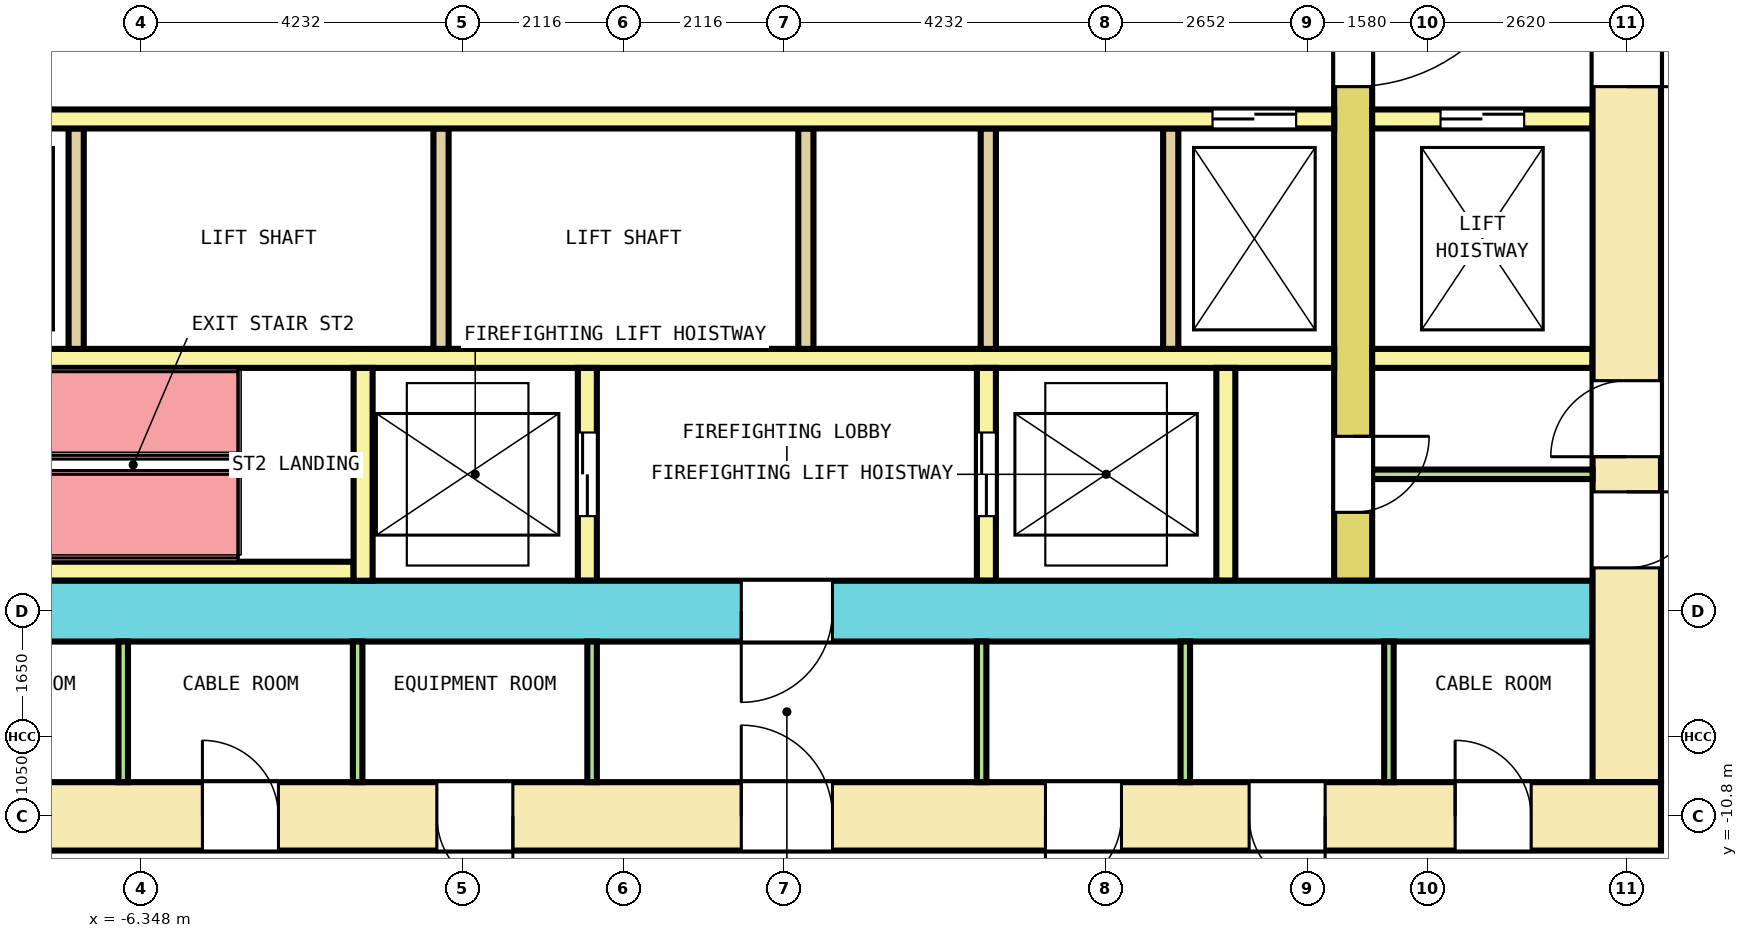
"""IFC4 building model, lengths in metres.
Left out: names, types, materials, properties, quantities, classifications, styles, units other than length and angle.
Written with IfcOpenShell. Run it as: python <this file> out.ifc"""

import sys

from ifc_helpers import new_model, si_unit, direction, frame, frame_2d, origin, place, context, subcontext, project, spatial, rectangle, extrude, element, fill, save


model = new_model("IFC4")
c1 = context("Model", 3, precision=1e-05, world=origin(), true_north=direction((0.0, 1.0)))
c2 = subcontext(c1, "Body", "Model", "MODEL_VIEW")
j1 = project(units=[si_unit("LENGTHUNIT", "METRE"), si_unit("PLANEANGLEUNIT", "RADIAN")], contexts=[c1])
p1 = place(None, origin())
s1 = spatial("IfcSite", under=j1, at=p1, CompositionType="ELEMENT")
p2 = place(p1, origin())
s2 = spatial("IfcBuilding", under=s1, at=p2, CompositionType="ELEMENT")
p3 = place(p2, frame((0.0, 0.0, 58.6)))
s3 = spatial("IfcBuildingStorey", under=s2, at=p3, CompositionType="ELEMENT", Elevation=58.6)
p4 = place(p3, frame((-13.65, -10.8, 0.0), z_axis=(0.0, 0.0, 1.0), x_axis=(1.0, 0.0, 0.0)))
e1 = element("IfcWall", 1, at=p4, inside=s3, PredefinedType="SHEAR", context=c2, shape_type="SweptSolid", body=[
    extrude(rectangle(XDim=27.3, YDim=0.9, at=frame_2d((13.65, 0.0))), origin(), (0.0, 0.0, 1.0), 4.1),
])
p5 = place(p4, frame((1.911, 0.0, 0.0)))
e2 = element("IfcOpeningElement", 2, at=p5, cuts=e1, PredefinedType="OPENING", context=c2, shape_type="SweptSolid", body=[
    extrude(rectangle(XDim=1.0, YDim=2.1, at=frame_2d((0.5, 1.05))), frame((0.0, 0.46, 0.0), z_axis=(0.0, -1.0, 0.0), x_axis=(1.0, 0.0, 0.0)), (0.0, 0.0, 1.0), 0.92),
])
p6 = place(p4, frame((5.027, 0.0, 0.0)))
e3 = element("IfcOpeningElement", 3, at=p6, cuts=e1, PredefinedType="OPENING", context=c2, shape_type="SweptSolid", body=[
    extrude(rectangle(XDim=1.0, YDim=2.1, at=frame_2d((0.5, 1.05))), frame((0.0, 0.46, 0.0), z_axis=(0.0, -1.0, 0.0), x_axis=(1.0, 0.0, 0.0)), (0.0, 0.0, 1.0), 0.92),
])
p7 = place(p4, frame((8.111, 0.0, 0.0)))
e4 = element("IfcOpeningElement", 4, at=p7, cuts=e1, PredefinedType="OPENING", context=c2, shape_type="SweptSolid", body=[
    extrude(rectangle(XDim=1.0, YDim=2.1, at=frame_2d((0.5, 1.05))), frame((0.0, 0.46, 0.0), z_axis=(0.0, -1.0, 0.0), x_axis=(1.0, 0.0, 0.0)), (0.0, 0.0, 1.0), 0.92),
])
p8 = place(p4, frame((11.195, 0.0, 0.0)))
e5 = element("IfcOpeningElement", 5, at=p8, cuts=e1, PredefinedType="OPENING", context=c2, shape_type="SweptSolid", body=[
    extrude(rectangle(XDim=1.0, YDim=2.1, at=frame_2d((0.5, 1.05))), frame((0.0, 0.46, 0.0), z_axis=(0.0, -1.0, 0.0), x_axis=(1.0, 0.0, 0.0)), (0.0, 0.0, 1.0), 0.92),
])
p9 = place(p4, frame((19.202, 0.0, 0.0)))
e6 = element("IfcOpeningElement", 6, at=p9, cuts=e1, PredefinedType="OPENING", context=c2, shape_type="SweptSolid", body=[
    extrude(rectangle(XDim=1.0, YDim=2.1, at=frame_2d((0.5, 1.05))), frame((0.0, 0.46, 0.0), z_axis=(0.0, -1.0, 0.0), x_axis=(1.0, 0.0, 0.0)), (0.0, 0.0, 1.0), 0.92),
])
p10 = place(p4, frame((21.881, 0.0, 0.0)))
e7 = element("IfcOpeningElement", 7, at=p10, cuts=e1, PredefinedType="OPENING", context=c2, shape_type="SweptSolid", body=[
    extrude(rectangle(XDim=1.0, YDim=2.1, at=frame_2d((0.5, 1.05))), frame((0.0, 0.46, 0.0), z_axis=(0.0, -1.0, 0.0), x_axis=(1.0, 0.0, 0.0)), (0.0, 0.0, 1.0), 0.92),
])
p11 = place(p4, frame((24.592, 0.0, 0.0)))
e8 = element("IfcOpeningElement", 8, at=p11, cuts=e1, PredefinedType="OPENING", context=c2, shape_type="SweptSolid", body=[
    extrude(rectangle(XDim=1.0, YDim=2.1, at=frame_2d((0.5, 1.05))), frame((0.0, 0.46, 0.0), z_axis=(0.0, -1.0, 0.0), x_axis=(1.0, 0.0, 0.0)), (0.0, 0.0, 1.0), 0.92),
])
p12 = place(p4, frame((15.2, 0.0, 0.0)))
e9 = element("IfcOpeningElement", 9, at=p12, cuts=e1, PredefinedType="OPENING", context=c2, shape_type="SweptSolid", body=[
    extrude(rectangle(XDim=1.2, YDim=2.1, at=frame_2d((0.6, 1.05))), frame((0.0, 0.46, 0.0), z_axis=(0.0, -1.0, 0.0), x_axis=(1.0, 0.0, 0.0)), (0.0, 0.0, 1.0), 0.92),
])
p13 = place(p3, frame((13.2, -10.35, 0.0), z_axis=(0.0, 0.0, 1.0), x_axis=(0.0, 1.0, 0.0)))
e10 = element("IfcWall", 10, at=p13, inside=s3, PredefinedType="SHEAR", context=c2, shape_type="SweptSolid", body=[
    extrude(rectangle(XDim=20.7, YDim=0.9, at=frame_2d((10.35, 0.0))), origin(), (0.0, 0.0, 1.0), 4.1),
])
p14 = place(p13, frame((9.15, 0.0, 0.0)))
e11 = element("IfcOpeningElement", 11, at=p14, cuts=e10, PredefinedType="OPENING", context=c2, shape_type="SweptSolid", body=[
    extrude(rectangle(XDim=2.4, YDim=2.1, at=frame_2d((1.2, 1.05))), frame((0.0, 0.46, 0.0), z_axis=(0.0, -1.0, 0.0), x_axis=(1.0, 0.0, 0.0)), (0.0, 0.0, 1.0), 0.92),
])
p15 = place(p13, frame((16.05, 0.0, 0.0)))
e12 = element("IfcOpeningElement", 12, at=p15, cuts=e10, PredefinedType="OPENING", context=c2, shape_type="SweptSolid", body=[
    extrude(rectangle(XDim=1.2, YDim=2.1, at=frame_2d((0.6, 1.05))), frame((0.0, 0.46, 0.0), z_axis=(0.0, -1.0, 0.0), x_axis=(1.0, 0.0, 0.0)), (0.0, 0.0, 1.0), 0.92),
])
p16 = place(p13, frame((2.819, 0.0, 0.0)))
e13 = element("IfcOpeningElement", 13, at=p16, cuts=e10, PredefinedType="OPENING", context=c2, shape_type="SweptSolid", body=[
    extrude(rectangle(XDim=1.0, YDim=2.1, at=frame_2d((0.5, 1.05))), frame((0.0, 0.46, 0.0), z_axis=(0.0, -1.0, 0.0), x_axis=(1.0, 0.0, 0.0)), (0.0, 0.0, 1.0), 0.92),
])
p17 = place(p13, frame((4.281, 0.0, 0.0)))
e14 = element("IfcOpeningElement", 14, at=p17, cuts=e10, PredefinedType="OPENING", context=c2, shape_type="SweptSolid", body=[
    extrude(rectangle(XDim=1.0, YDim=2.1, at=frame_2d((0.5, 1.05))), frame((0.0, 0.46, 0.0), z_axis=(0.0, -1.0, 0.0), x_axis=(1.0, 0.0, 0.0)), (0.0, 0.0, 1.0), 0.92),
])
p18 = place(p3, frame((-12.75, -8.1, 0.0), z_axis=(0.0, 0.0, 1.0), x_axis=(1.0, 0.0, 0.0)))
e15 = element("IfcWall", 15, at=p18, inside=s3, PredefinedType="SHEAR", context=c2, shape_type="SweptSolid", body=[
    extrude(rectangle(XDim=25.5, YDim=0.8, at=frame_2d((12.75, 0.0))), origin(), (0.0, 0.0, 1.0), 4.1),
])
p19 = place(p18, frame((14.3, 0.0, 0.0)))
e16 = element("IfcOpeningElement", 16, at=p19, cuts=e15, PredefinedType="OPENING", context=c2, shape_type="SweptSolid", body=[
    extrude(rectangle(XDim=1.2, YDim=2.1, at=frame_2d((0.6, 1.05))), frame((0.0, 0.41, 0.0), z_axis=(0.0, -1.0, 0.0), x_axis=(1.0, 0.0, 0.0)), (0.0, 0.0, 1.0), 0.82),
])
p20 = place(p3, frame((9.6, -7.7, 0.0), z_axis=(0.0, 0.0, 1.0), x_axis=(0.0, 1.0, 0.0)))
e17 = element("IfcWall", 17, at=p20, inside=s3, PredefinedType="SHEAR", context=c2, shape_type="SweptSolid", body=[
    extrude(rectangle(XDim=15.4, YDim=0.5, at=frame_2d((7.7, 0.0))), origin(), (0.0, 0.0, 1.0), 4.1),
])
p21 = place(p20, frame((6.5, 0.0, 0.0)))
e18 = element("IfcOpeningElement", 18, at=p21, cuts=e17, PredefinedType="OPENING", context=c2, shape_type="SweptSolid", body=[
    extrude(rectangle(XDim=2.4, YDim=2.1, at=frame_2d((1.2, 1.05))), frame((0.0, 0.26, 0.0), z_axis=(0.0, -1.0, 0.0), x_axis=(1.0, 0.0, 0.0)), (0.0, 0.0, 1.0), 0.52),
])
p22 = place(p20, frame((13.4, 0.0, 0.0)))
e19 = element("IfcOpeningElement", 19, at=p22, cuts=e17, PredefinedType="OPENING", context=c2, shape_type="SweptSolid", body=[
    extrude(rectangle(XDim=1.2, YDim=2.1, at=frame_2d((0.6, 1.05))), frame((0.0, 0.26, 0.0), z_axis=(0.0, -1.0, 0.0), x_axis=(1.0, 0.0, 0.0)), (0.0, 0.0, 1.0), 0.52),
])
p23 = place(p20, frame((0.9, 0.0, 0.0)))
e20 = element("IfcOpeningElement", 20, at=p23, cuts=e17, PredefinedType="OPENING", context=c2, shape_type="SweptSolid", body=[
    extrude(rectangle(XDim=1.0, YDim=2.1, at=frame_2d((0.5, 1.05))), frame((0.0, 0.26, 0.0), z_axis=(0.0, -1.0, 0.0), x_axis=(1.0, 0.0, 0.0)), (0.0, 0.0, 1.0), 0.52),
])
p24 = place(p3, frame((-9.35, -1.625, 0.0), z_axis=(0.0, 0.0, 1.0), x_axis=(1.0, 0.0, 0.0)))
e21 = element("IfcWall", 21, at=p24, inside=s3, PredefinedType="SOLIDWALL", context=c2, shape_type="SweptSolid", body=[
    extrude(rectangle(XDim=18.7, YDim=0.25, at=frame_2d((9.35, 0.0))), origin(), (0.0, 0.0, 1.0), 4.1),
])
p25 = place(p24, frame((0.5, 0.0, 0.0)))
e22 = element("IfcOpeningElement", 22, at=p25, cuts=e21, PredefinedType="OPENING", context=c2, shape_type="SweptSolid", body=[
    extrude(rectangle(XDim=1.1, YDim=2.1, at=frame_2d((0.55, 1.05))), frame((0.0, 0.135, 0.0), z_axis=(0.0, -1.0, 0.0), x_axis=(1.0, 0.0, 0.0)), (0.0, 0.0, 1.0), 0.27),
])
p26 = place(p24, frame((17.1, 0.0, 0.0)))
e23 = element("IfcOpeningElement", 23, at=p26, cuts=e21, PredefinedType="OPENING", context=c2, shape_type="SweptSolid", body=[
    extrude(rectangle(XDim=1.1, YDim=2.1, at=frame_2d((0.55, 1.05))), frame((0.0, 0.135, 0.0), z_axis=(0.0, -1.0, 0.0), x_axis=(1.0, 0.0, 0.0)), (0.0, 0.0, 1.0), 0.27),
])
p27 = place(p3, frame((9.85, -1.625, 0.0), z_axis=(0.0, 0.0, 1.0), x_axis=(1.0, 0.0, 0.0)))
e24 = element("IfcWall", 24, at=p27, inside=s3, PredefinedType="SOLIDWALL", context=c2, shape_type="SweptSolid", body=[
    extrude(rectangle(XDim=2.9, YDim=0.25, at=frame_2d((1.45, 0.0))), origin(), (0.0, 0.0, 1.0), 4.1),
])
p28 = place(p27, frame((0.9, 0.0, 0.0)))
e25 = element("IfcOpeningElement", 25, at=p28, cuts=e24, PredefinedType="OPENING", context=c2, shape_type="SweptSolid", body=[
    extrude(rectangle(XDim=1.1, YDim=2.1, at=frame_2d((0.55, 1.05))), frame((0.0, 0.135, 0.0), z_axis=(0.0, -1.0, 0.0), x_axis=(1.0, 0.0, 0.0)), (0.0, 0.0, 1.0), 0.27),
])
p29 = place(p3, frame((-9.35, -4.775, 0.0), z_axis=(0.0, 0.0, 1.0), x_axis=(1.0, 0.0, 0.0)))
e26 = element("IfcWall", 26, at=p29, inside=s3, PredefinedType="SOLIDWALL", context=c2, shape_type="SweptSolid", body=[
    extrude(rectangle(XDim=18.7, YDim=0.25, at=frame_2d((9.35, 0.0))), origin(), (0.0, 0.0, 1.0), 4.1),
])
p30 = place(p3, frame((9.85, -4.775, 0.0), z_axis=(0.0, 0.0, 1.0), x_axis=(1.0, 0.0, 0.0)))
e27 = element("IfcWall", 27, at=p30, inside=s3, PredefinedType="SOLIDWALL", context=c2, shape_type="SweptSolid", body=[
    extrude(rectangle(XDim=2.9, YDim=0.25, at=frame_2d((1.45, 0.0))), origin(), (0.0, 0.0, 1.0), 4.1),
])
for number, where, z_axis, x_axis in (
    (28, (-7.2, -4.65, 0.0), (0.0, 0.0, 1.0), (0.0, 1.0, 0.0)),
    (29, (-2.4, -4.65, 0.0), (0.0, 0.0, 1.0), (0.0, 1.0, 0.0)),
    (30, (2.4, -4.65, 0.0), (0.0, 0.0, 1.0), (0.0, 1.0, 0.0)),
    (31, (4.8, -4.65, 0.0), (0.0, 0.0, 1.0), (0.0, 1.0, 0.0)),
    (32, (7.2, -4.65, 0.0), (0.0, 0.0, 1.0), (0.0, 1.0, 0.0)),
):
    element("IfcWall", number, at=place(p3, frame(where, z_axis=z_axis, x_axis=x_axis)), inside=s3, PredefinedType="SOLIDWALL", context=c2, shape_type="SweptSolid", body=[
        extrude(rectangle(XDim=2.9, YDim=0.2, at=frame_2d((1.45, 0.0))), origin(), (0.0, 0.0, 1.0), 4.1),
    ])
p31 = place(p3, frame((-9.35, -7.575, 0.0), z_axis=(0.0, 0.0, 1.0), x_axis=(1.0, 0.0, 0.0)))
e33 = element("IfcWall", 33, at=p31, inside=s3, PredefinedType="SOLIDWALL", context=c2, shape_type="SweptSolid", body=[
    extrude(rectangle(XDim=5.8, YDim=0.25, at=frame_2d((2.9, 0.0))), origin(), (0.0, 0.0, 1.0), 4.1),
])
p32 = place(p3, frame((-3.425, -7.7, 0.0), z_axis=(0.0, 0.0, 1.0), x_axis=(0.0, 1.0, 0.0)))
e34 = element("IfcWall", 34, at=p32, inside=s3, PredefinedType="SOLIDWALL", context=c2, shape_type="SweptSolid", body=[
    extrude(rectangle(XDim=2.8, YDim=0.25, at=frame_2d((1.4, 0.0))), origin(), (0.0, 0.0, 1.0), 4.1),
])
p33 = place(p3, frame((-0.475, -7.7, 0.0), z_axis=(0.0, 0.0, 1.0), x_axis=(0.0, 1.0, 0.0)))
e35 = element("IfcWall", 35, at=p33, inside=s3, PredefinedType="SOLIDWALL", context=c2, shape_type="SweptSolid", body=[
    extrude(rectangle(XDim=2.8, YDim=0.25, at=frame_2d((1.4, 0.0))), origin(), (0.0, 0.0, 1.0), 4.1),
])
p34 = place(p33, frame((0.85, 0.0, 0.0)))
e36 = element("IfcOpeningElement", 36, at=p34, cuts=e35, PredefinedType="OPENING", context=c2, shape_type="SweptSolid", body=[
    extrude(rectangle(XDim=1.1, YDim=2.1, at=frame_2d((0.55, 1.05))), frame((0.0, 0.135, 0.0), z_axis=(0.0, -1.0, 0.0), x_axis=(1.0, 0.0, 0.0)), (0.0, 0.0, 1.0), 0.27),
])
p35 = place(p3, frame((4.775, -7.7, 0.0), z_axis=(0.0, 0.0, 1.0), x_axis=(0.0, 1.0, 0.0)))
e37 = element("IfcWall", 37, at=p35, inside=s3, PredefinedType="SOLIDWALL", context=c2, shape_type="SweptSolid", body=[
    extrude(rectangle(XDim=2.8, YDim=0.25, at=frame_2d((1.4, 0.0))), origin(), (0.0, 0.0, 1.0), 4.1),
])
p36 = place(p35, frame((0.85, 0.0, 0.0)))
e38 = element("IfcOpeningElement", 38, at=p36, cuts=e37, PredefinedType="OPENING", context=c2, shape_type="SweptSolid", body=[
    extrude(rectangle(XDim=1.1, YDim=2.1, at=frame_2d((0.55, 1.05))), frame((0.0, 0.135, 0.0), z_axis=(0.0, -1.0, 0.0), x_axis=(1.0, 0.0, 0.0)), (0.0, 0.0, 1.0), 0.27),
])
p37 = place(p3, frame((7.925, -7.7, 0.0), z_axis=(0.0, 0.0, 1.0), x_axis=(0.0, 1.0, 0.0)))
e39 = element("IfcWall", 39, at=p37, inside=s3, PredefinedType="SOLIDWALL", context=c2, shape_type="SweptSolid", body=[
    extrude(rectangle(XDim=2.8, YDim=0.25, at=frame_2d((1.4, 0.0))), origin(), (0.0, 0.0, 1.0), 4.1),
])
p38 = place(p3, frame((9.85, -6.3, 0.0), z_axis=(0.0, 0.0, 1.0), x_axis=(1.0, 0.0, 0.0)))
e40 = element("IfcWall", 40, at=p38, inside=s3, PredefinedType="PARTITIONING", context=c2, shape_type="SweptSolid", body=[
    extrude(rectangle(XDim=2.9, YDim=0.125, at=frame_2d((1.45, 0.0))), origin(), (0.0, 0.0, 1.0), 4.1),
])
for number, where, z_axis, x_axis in (
    (41, (-6.581, -10.35, 0.0), (0.0, 0.0, 1.0), (0.0, 1.0, 0.0)),
    (42, (-3.497, -10.35, 0.0), (0.0, 0.0, 1.0), (0.0, 1.0, 0.0)),
    (43, (-0.413, -10.35, 0.0), (0.0, 0.0, 1.0), (0.0, 1.0, 0.0)),
    (44, (4.712, -10.35, 0.0), (0.0, 0.0, 1.0), (0.0, 1.0, 0.0)),
    (45, (7.392, -10.35, 0.0), (0.0, 0.0, 1.0), (0.0, 1.0, 0.0)),
    (46, (10.071, -10.35, 0.0), (0.0, 0.0, 1.0), (0.0, 1.0, 0.0)),
):
    element("IfcWall", number, at=place(p3, frame(where, z_axis=z_axis, x_axis=x_axis)), inside=s3, PredefinedType="PARTITIONING", context=c2, shape_type="SweptSolid", body=[
        extrude(rectangle(XDim=1.85, YDim=0.125, at=frame_2d((0.925, 0.0))), origin(), (0.0, 0.0, 1.0), 4.1),
    ])
p39 = place(p26, origin())
e47 = element("IfcDoor", 47, at=p39, inside=s3, OperationType="DOUBLE_DOOR_SLIDING", PredefinedType="DOOR", context=c2, shape_type="SweptSolid", body=[
    extrude(rectangle(XDim=1.1, YDim=2.1, at=frame_2d((0.55, 1.05))), frame((0.0, 0.075, 0.0), z_axis=(0.0, -1.0, 0.0), x_axis=(1.0, 0.0, 0.0)), (0.0, 0.0, 1.0), 0.15),
])
fill(e23, e47)
p40 = place(p28, origin())
e48 = element("IfcDoor", 48, at=p40, inside=s3, OperationType="DOUBLE_DOOR_SLIDING", PredefinedType="DOOR", context=c2, shape_type="SweptSolid", body=[
    extrude(rectangle(XDim=1.1, YDim=2.1, at=frame_2d((0.55, 1.05))), frame((0.0, 0.075, 0.0), z_axis=(0.0, -1.0, 0.0), x_axis=(1.0, 0.0, 0.0)), (0.0, 0.0, 1.0), 0.15),
])
fill(e25, e48)
p41 = place(p34, origin())
e49 = element("IfcDoor", 49, at=p41, inside=s3, OperationType="DOUBLE_DOOR_SLIDING", PredefinedType="DOOR", context=c2, shape_type="SweptSolid", body=[
    extrude(rectangle(XDim=1.1, YDim=2.1, at=frame_2d((0.55, 1.05))), frame((0.0, 0.075, 0.0), z_axis=(0.0, -1.0, 0.0), x_axis=(1.0, 0.0, 0.0)), (0.0, 0.0, 1.0), 0.15),
])
fill(e36, e49)
p42 = place(p36, origin())
e50 = element("IfcDoor", 50, at=p42, inside=s3, OperationType="DOUBLE_DOOR_SLIDING", PredefinedType="DOOR", context=c2, shape_type="SweptSolid", body=[
    extrude(rectangle(XDim=1.1, YDim=2.1, at=frame_2d((0.55, 1.05))), frame((0.0, 0.075, 0.0), z_axis=(0.0, -1.0, 0.0), x_axis=(1.0, 0.0, 0.0)), (0.0, 0.0, 1.0), 0.15),
])
fill(e38, e50)
p43 = place(p21, origin())
e51 = element("IfcDoor", 51, at=p43, inside=s3, OperationType="DOUBLE_DOOR_SINGLE_SWING", PredefinedType="DOOR", context=c2, shape_type="SweptSolid", body=[
    extrude(rectangle(XDim=2.4, YDim=2.1, at=frame_2d((1.2, 1.05))), frame((0.0, 0.2, 0.0), z_axis=(0.0, -1.0, 0.0), x_axis=(1.0, 0.0, 0.0)), (0.0, 0.0, 1.0), 0.4),
])
fill(e18, e51)
p44 = place(p14, origin())
e52 = element("IfcDoor", 52, at=p44, inside=s3, OperationType="DOUBLE_DOOR_SINGLE_SWING", PredefinedType="DOOR", context=c2, shape_type="SweptSolid", body=[
    extrude(rectangle(XDim=2.4, YDim=2.1, at=frame_2d((1.2, 1.05))), frame((0.0, 0.3, 0.0), z_axis=(0.0, -1.0, 0.0), x_axis=(1.0, 0.0, 0.0)), (0.0, 0.0, 1.0), 0.6),
])
fill(e11, e52)
p45 = place(p19, origin())
e53 = element("IfcDoor", 53, at=p45, inside=s3, OperationType="SINGLE_SWING_LEFT", PredefinedType="DOOR", context=c2, shape_type="SweptSolid", body=[
    extrude(rectangle(XDim=1.2, YDim=2.1, at=frame_2d((0.6, 1.05))), frame((0.0, 0.3, 0.0), z_axis=(0.0, -1.0, 0.0), x_axis=(1.0, 0.0, 0.0)), (0.0, 0.0, 1.0), 0.6),
])
fill(e16, e53)
p46 = place(p23, origin())
e54 = element("IfcDoor", 54, at=p46, inside=s3, OperationType="SINGLE_SWING_LEFT", PredefinedType="DOOR", context=c2, shape_type="SweptSolid", body=[
    extrude(rectangle(XDim=1.0, YDim=2.1, at=frame_2d((0.5, 1.05))), frame((0.0, 0.2, 0.0), z_axis=(0.0, -1.0, 0.0), x_axis=(1.0, 0.0, 0.0)), (0.0, 0.0, 1.0), 0.4),
])
fill(e20, e54)
p47 = place(p16, origin())
e55 = element("IfcDoor", 55, at=p47, inside=s3, OperationType="SINGLE_SWING_RIGHT", PredefinedType="DOOR", context=c2, shape_type="SweptSolid", body=[
    extrude(rectangle(XDim=1.0, YDim=2.1, at=frame_2d((0.5, 1.05))), frame((0.0, 0.3, 0.0), z_axis=(0.0, -1.0, 0.0), x_axis=(1.0, 0.0, 0.0)), (0.0, 0.0, 1.0), 0.6),
])
fill(e13, e55)
p48 = place(p17, origin())
e56 = element("IfcDoor", 56, at=p48, inside=s3, OperationType="SINGLE_SWING_LEFT", PredefinedType="DOOR", context=c2, shape_type="SweptSolid", body=[
    extrude(rectangle(XDim=1.0, YDim=2.1, at=frame_2d((0.5, 1.05))), frame((0.0, 0.3, 0.0), z_axis=(0.0, -1.0, 0.0), x_axis=(1.0, 0.0, 0.0)), (0.0, 0.0, 1.0), 0.6),
])
fill(e14, e56)
p49 = place(p7, origin())
e57 = element("IfcDoor", 57, at=p49, inside=s3, OperationType="SINGLE_SWING_LEFT", PredefinedType="DOOR", context=c2, shape_type="SweptSolid", body=[
    extrude(rectangle(XDim=1.0, YDim=2.1, at=frame_2d((0.5, 1.05))), frame((0.0, 0.3, 0.0), z_axis=(0.0, -1.0, 0.0), x_axis=(1.0, 0.0, 0.0)), (0.0, 0.0, 1.0), 0.6),
])
fill(e4, e57)
p50 = place(p8, origin())
e58 = element("IfcDoor", 58, at=p50, inside=s3, OperationType="SINGLE_SWING_RIGHT", PredefinedType="DOOR", context=c2, shape_type="SweptSolid", body=[
    extrude(rectangle(XDim=1.0, YDim=2.1, at=frame_2d((0.5, 1.05))), frame((0.0, 0.3, 0.0), z_axis=(0.0, -1.0, 0.0), x_axis=(1.0, 0.0, 0.0)), (0.0, 0.0, 1.0), 0.6),
])
fill(e5, e58)
p51 = place(p9, origin())
e59 = element("IfcDoor", 59, at=p51, inside=s3, OperationType="SINGLE_SWING_LEFT", PredefinedType="DOOR", context=c2, shape_type="SweptSolid", body=[
    extrude(rectangle(XDim=1.0, YDim=2.1, at=frame_2d((0.5, 1.05))), frame((0.0, 0.3, 0.0), z_axis=(0.0, -1.0, 0.0), x_axis=(1.0, 0.0, 0.0)), (0.0, 0.0, 1.0), 0.6),
])
fill(e6, e59)
p52 = place(p10, origin())
e60 = element("IfcDoor", 60, at=p52, inside=s3, OperationType="SINGLE_SWING_RIGHT", PredefinedType="DOOR", context=c2, shape_type="SweptSolid", body=[
    extrude(rectangle(XDim=1.0, YDim=2.1, at=frame_2d((0.5, 1.05))), frame((0.0, 0.3, 0.0), z_axis=(0.0, -1.0, 0.0), x_axis=(1.0, 0.0, 0.0)), (0.0, 0.0, 1.0), 0.6),
])
fill(e7, e60)
p53 = place(p11, origin())
e61 = element("IfcDoor", 61, at=p53, inside=s3, OperationType="SINGLE_SWING_LEFT", PredefinedType="DOOR", context=c2, shape_type="SweptSolid", body=[
    extrude(rectangle(XDim=1.0, YDim=2.1, at=frame_2d((0.5, 1.05))), frame((0.0, 0.3, 0.0), z_axis=(0.0, -1.0, 0.0), x_axis=(1.0, 0.0, 0.0)), (0.0, 0.0, 1.0), 0.6),
])
fill(e8, e61)
p54 = place(p12, origin())
e62 = element("IfcDoor", 62, at=p54, inside=s3, OperationType="SINGLE_SWING_RIGHT", PredefinedType="DOOR", context=c2, shape_type="SweptSolid", body=[
    extrude(rectangle(XDim=1.2, YDim=2.1, at=frame_2d((0.6, 1.05))), frame((0.0, 0.3, 0.0), z_axis=(0.0, -1.0, 0.0), x_axis=(1.0, 0.0, 0.0)), (0.0, 0.0, 1.0), 0.6),
])
fill(e9, e62)
save(model, sys.argv[1])
